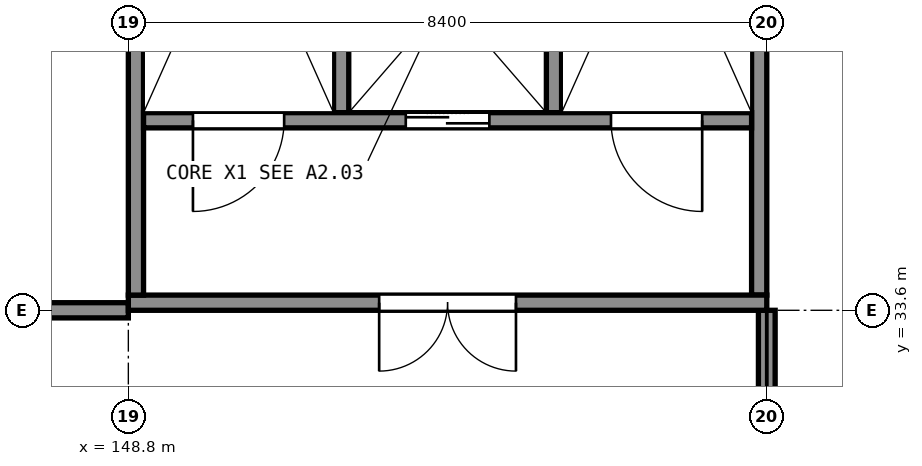
"""IFC4 building model, lengths in metres.
Left out: names, types, materials, properties, quantities, classifications, styles, units other than length and angle.
Written with IfcOpenShell. Run it as: python <this file> out.ifc"""

import sys

from ifc_helpers import new_model, si_unit, direction, frame, frame_2d, origin, place, context, subcontext, project, spatial, rectangle, extrude, element, fill, save


model = new_model("IFC4")
c1 = context("Model", 3, precision=1e-05, world=origin(), true_north=direction((0.0, 1.0)))
c2 = subcontext(c1, "Body", "Model", "MODEL_VIEW")
j1 = project(units=[si_unit("LENGTHUNIT", "METRE"), si_unit("PLANEANGLEUNIT", "RADIAN")], contexts=[c1])
p1 = place(None, origin())
s1 = spatial("IfcSite", under=j1, at=p1, CompositionType="ELEMENT")
p2 = place(p1, origin())
s2 = spatial("IfcBuilding", under=s1, at=p2, CompositionType="ELEMENT")
p3 = place(p2, frame((0.0, 0.0, 20.0)))
s3 = spatial("IfcBuildingStorey", under=s2, at=p3, CompositionType="ELEMENT", Elevation=20.0)
p4 = place(p3, frame((148.8, 33.7, 0.0), z_axis=(0.0, 0.0, 1.0), x_axis=(1.0, 0.0, 0.0)))
e1 = element("IfcWall", 1, at=p4, inside=s3, PredefinedType="SHEAR", context=c2, shape_type="SweptSolid", body=[
    extrude(rectangle(XDim=8.4, YDim=0.2, at=frame_2d((4.2, 0.0))), origin(), (0.0, 0.0, 1.0), 5.0),
])
p5 = place(p4, frame((3.3, 0.0, 0.0)))
e2 = element("IfcOpeningElement", 2, at=p5, cuts=e1, PredefinedType="OPENING", context=c2, shape_type="SweptSolid", body=[
    extrude(rectangle(XDim=1.8, YDim=2.1, at=frame_2d((0.9, 1.05))), frame((0.0, 0.11, 0.0), z_axis=(0.0, -1.0, 0.0), x_axis=(1.0, 0.0, 0.0)), (0.0, 0.0, 1.0), 0.22),
])
for number, where, z_axis, x_axis in (
    (3, (148.9, 33.8, 0.0), (0.0, 0.0, 1.0), (0.0, 1.0, 0.0)),
    (4, (157.1, 33.8, 0.0), (0.0, 0.0, 1.0), (0.0, 1.0, 0.0)),
):
    element("IfcWall", number, at=place(p3, frame(where, z_axis=z_axis, x_axis=x_axis)), inside=s3, PredefinedType="SHEAR", context=c2, shape_type="SweptSolid", body=[
        extrude(rectangle(XDim=8.0, YDim=0.2, at=frame_2d((4.0, 0.0))), origin(), (0.0, 0.0, 1.0), 5.0),
    ])
p6 = place(p3, frame((149.0, 36.1, 0.0), z_axis=(0.0, 0.0, 1.0), x_axis=(1.0, 0.0, 0.0)))
e5 = element("IfcWall", 5, at=p6, inside=s3, PredefinedType="SHEAR", context=c2, shape_type="SweptSolid", body=[
    extrude(rectangle(XDim=8.0, YDim=0.2, at=frame_2d((4.0, 0.0))), origin(), (0.0, 0.0, 1.0), 5.0),
])
p7 = place(p6, frame((0.65, 0.0, 0.0)))
e6 = element("IfcOpeningElement", 6, at=p7, cuts=e5, PredefinedType="OPENING", context=c2, shape_type="SweptSolid", body=[
    extrude(rectangle(XDim=1.2, YDim=2.1, at=frame_2d((0.6, 1.05))), frame((0.0, 0.11, 0.0), z_axis=(0.0, -1.0, 0.0), x_axis=(1.0, 0.0, 0.0)), (0.0, 0.0, 1.0), 0.22),
])
p8 = place(p6, frame((6.15, 0.0, 0.0)))
e7 = element("IfcOpeningElement", 7, at=p8, cuts=e5, PredefinedType="OPENING", context=c2, shape_type="SweptSolid", body=[
    extrude(rectangle(XDim=1.2, YDim=2.1, at=frame_2d((0.6, 1.05))), frame((0.0, 0.11, 0.0), z_axis=(0.0, -1.0, 0.0), x_axis=(1.0, 0.0, 0.0)), (0.0, 0.0, 1.0), 0.22),
])
p9 = place(p6, frame((3.45, 0.0, 0.0)))
e8 = element("IfcOpeningElement", 8, at=p9, cuts=e5, PredefinedType="OPENING", context=c2, shape_type="SweptSolid", body=[
    extrude(rectangle(XDim=1.1, YDim=2.1, at=frame_2d((0.55, 1.05))), frame((0.0, 0.11, 0.0), z_axis=(0.0, -1.0, 0.0), x_axis=(1.0, 0.0, 0.0)), (0.0, 0.0, 1.0), 0.22),
])
for number, where, z_axis, x_axis in (
    (9, (151.6, 36.2, 0.0), (0.0, 0.0, 1.0), (0.0, 1.0, 0.0)),
    (10, (154.4, 36.2, 0.0), (0.0, 0.0, 1.0), (0.0, 1.0, 0.0)),
):
    element("IfcWall", number, at=place(p3, frame(where, z_axis=z_axis, x_axis=x_axis)), inside=s3, PredefinedType="SHEAR", context=c2, shape_type="SweptSolid", body=[
        extrude(rectangle(XDim=5.6, YDim=0.2, at=frame_2d((2.8, 0.0))), origin(), (0.0, 0.0, 1.0), 5.0),
    ])
p10 = place(p3, frame((157.2, 25.55, 0.0), z_axis=(0.0, 0.0, 1.0), x_axis=(0.0, 1.0, 0.0)))
e11 = element("IfcWall", 11, at=p10, inside=s3, PredefinedType="SOLIDWALL", context=c2, shape_type="SweptSolid", body=[
    extrude(rectangle(XDim=8.05, YDim=0.22, at=frame_2d((4.025, 0.0))), origin(), (0.0, 0.0, 1.0), 3.94),
])
p11 = place(p3, frame((144.5, 33.6, 0.0), z_axis=(0.0, 0.0, 1.0), x_axis=(1.0, 0.0, 0.0)))
e12 = element("IfcWall", 12, at=p11, inside=s3, PredefinedType="PARTITIONING", context=c2, shape_type="SweptSolid", body=[
    extrude(rectangle(XDim=4.3, YDim=0.2, at=frame_2d((2.15, 0.0))), origin(), (0.0, 0.0, 1.0), 3.9),
])
p12 = place(p11, frame((1.75, 0.0, 0.0)))
e13 = element("IfcOpeningElement", 13, at=p12, cuts=e12, PredefinedType="OPENING", context=c2, shape_type="SweptSolid", body=[
    extrude(rectangle(XDim=1.0, YDim=2.1, at=frame_2d((0.5, 1.05))), frame((0.0, 0.11, 0.0), z_axis=(0.0, -1.0, 0.0), x_axis=(1.0, 0.0, 0.0)), (0.0, 0.0, 1.0), 0.22),
])
p13 = place(p5, origin())
e14 = element("IfcDoor", 14, at=p13, inside=s3, OperationType="DOUBLE_DOOR_SINGLE_SWING", PredefinedType="DOOR", context=c2, shape_type="SweptSolid", body=[
    extrude(rectangle(XDim=1.8, YDim=2.1, at=frame_2d((0.9, 1.05))), frame((0.0, 0.025, 0.0), z_axis=(0.0, -1.0, 0.0), x_axis=(1.0, 0.0, 0.0)), (0.0, 0.0, 1.0), 0.05),
])
fill(e2, e14)
p14 = place(p7, origin())
e15 = element("IfcDoor", 15, at=p14, inside=s3, OperationType="SINGLE_SWING_LEFT", PredefinedType="DOOR", context=c2, shape_type="SweptSolid", body=[
    extrude(rectangle(XDim=1.2, YDim=2.1, at=frame_2d((0.6, 1.05))), frame((0.0, 0.025, 0.0), z_axis=(0.0, -1.0, 0.0), x_axis=(1.0, 0.0, 0.0)), (0.0, 0.0, 1.0), 0.05),
])
fill(e6, e15)
p15 = place(p8, origin())
e16 = element("IfcDoor", 16, at=p15, inside=s3, OperationType="SINGLE_SWING_RIGHT", PredefinedType="DOOR", context=c2, shape_type="SweptSolid", body=[
    extrude(rectangle(XDim=1.2, YDim=2.1, at=frame_2d((0.6, 1.05))), frame((0.0, 0.025, 0.0), z_axis=(0.0, -1.0, 0.0), x_axis=(1.0, 0.0, 0.0)), (0.0, 0.0, 1.0), 0.05),
])
fill(e7, e16)
p16 = place(p9, origin())
e17 = element("IfcDoor", 17, at=p16, inside=s3, OperationType="DOUBLE_DOOR_SLIDING", PredefinedType="DOOR", context=c2, shape_type="SweptSolid", body=[
    extrude(rectangle(XDim=1.1, YDim=2.1, at=frame_2d((0.55, 1.05))), frame((0.0, 0.025, 0.0), z_axis=(0.0, -1.0, 0.0), x_axis=(1.0, 0.0, 0.0)), (0.0, 0.0, 1.0), 0.05),
])
fill(e8, e17)
save(model, sys.argv[1])
